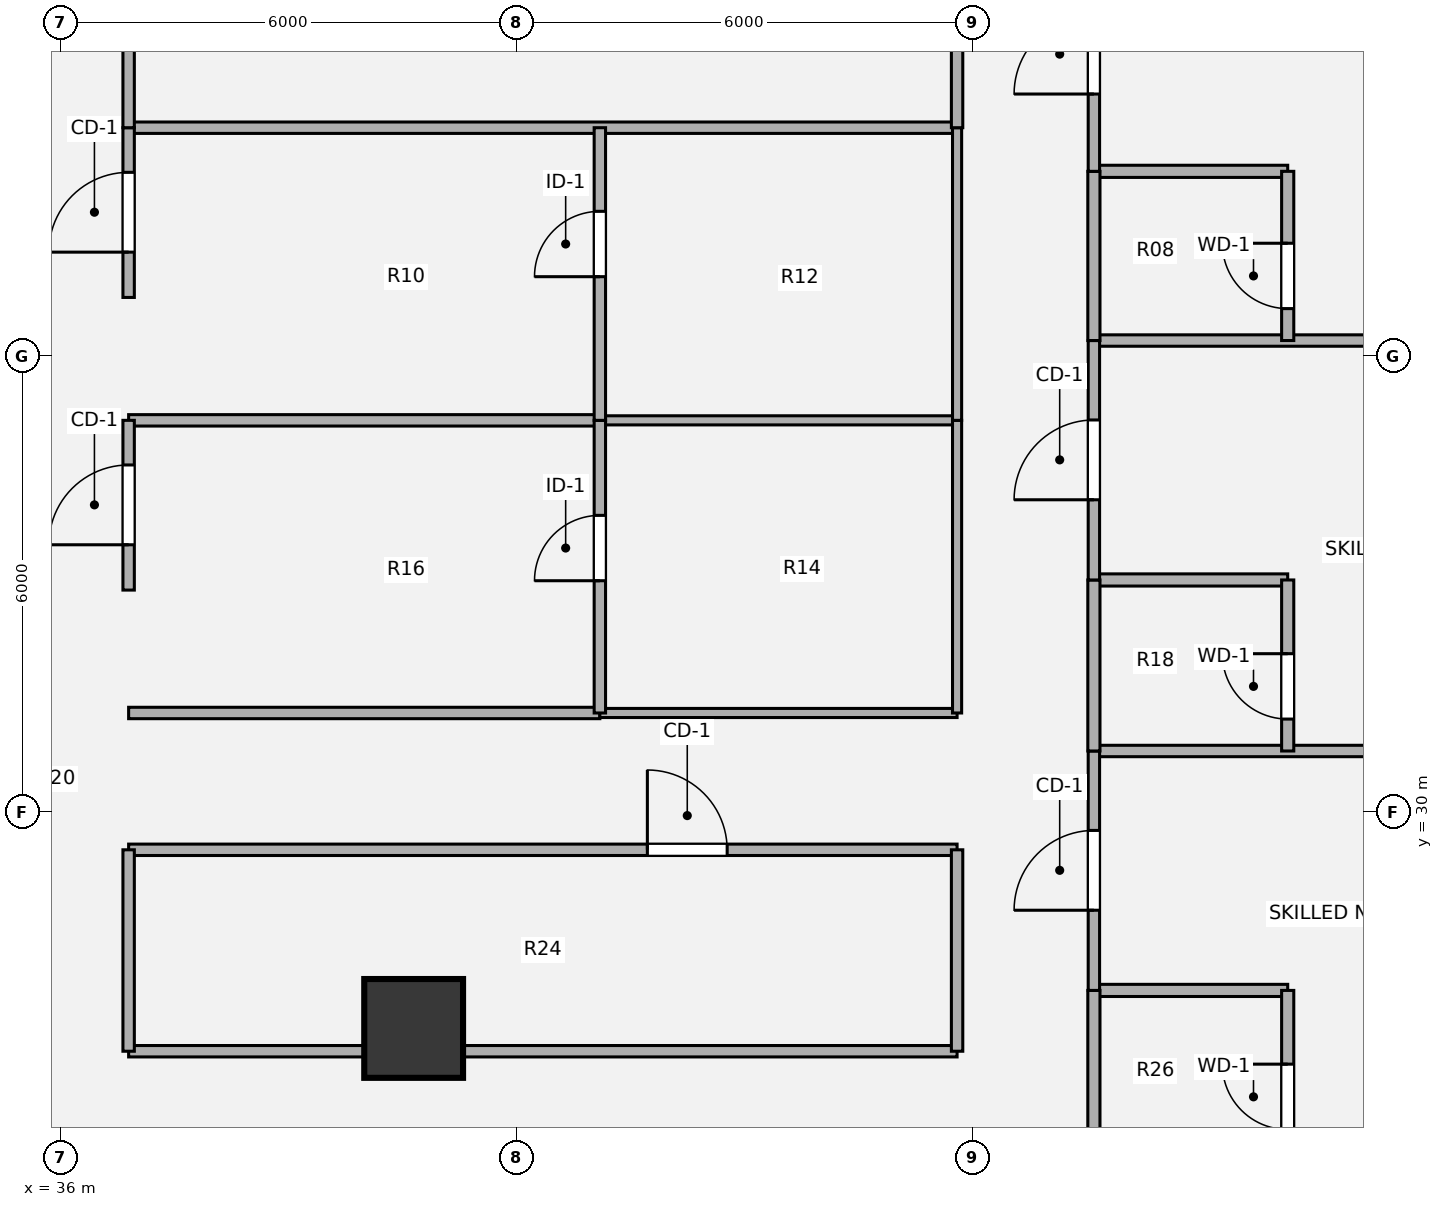
"""IFC4 building model, lengths in metres.
Left out: names, types, materials, properties, quantities, classifications, styles, units other than length and angle.
Written with IfcOpenShell. Run it as: python <this file> out.ifc"""

import sys

from ifc_helpers import new_model, si_unit, direction, frame, frame_2d, origin, origin_2d, place, context, subcontext, project, spatial, rectangle, hollow_circle, extrude, source, transform, mapped, element, fill, save


model = new_model("IFC4")
c1 = context("Model", 3, precision=1e-05, world=origin(), true_north=direction((0.0, 1.0)))
c2 = subcontext(c1, "Body", "Model", "MODEL_VIEW")
j1 = project(units=[si_unit("LENGTHUNIT", "METRE"), si_unit("PLANEANGLEUNIT", "RADIAN")], contexts=[c1])
p1 = place(None, origin())
s1 = spatial("IfcSite", under=j1, at=p1, CompositionType="ELEMENT")
p2 = place(p1, origin())
s2 = spatial("IfcBuilding", under=s1, at=p2, CompositionType="ELEMENT")
p3 = place(p2, frame((0.0, 0.0, 127.62)))
s3 = spatial("IfcBuildingStorey", under=s2, at=p3, CompositionType="ELEMENT", Elevation=127.62)
m1 = source(origin(), c2, "Body", "SweptSolid", [
    extrude(hollow_circle(Radius=0.65, WallThickness=0.045, at=origin_2d()), origin(), (0.0, 0.0, 1.0), 3.78),
])
p4 = place(p3, frame((40.65, 27.15, 0.0), z_axis=(0.0, 0.0, 1.0), x_axis=(1.0, 0.0, 0.0)))
e1 = element("IfcColumn", 1, at=p4, inside=s3, PredefinedType="COLUMN", context=c2, shape_type="MappedRepresentation", body=[
    mapped(m1, transform((0.0, 0.0, 0.0), x_axis=(1.0, 0.0, 0.0), y_axis=(0.0, 1.0, 0.0), z_axis=(0.0, 0.0, 1.0), scale=1.0)),
])
p5 = place(p3, frame((36.9, 26.85, 0.0), z_axis=(0.0, 0.0, 1.0), x_axis=(1.0, 0.0, 0.0)))
e2 = element("IfcWall", 2, at=p5, inside=s3, PredefinedType="PARTITIONING", context=c2, shape_type="SweptSolid", body=[
    extrude(rectangle(XDim=10.9, YDim=0.15, at=frame_2d((5.45, 0.0))), origin(), (0.0, 0.0, 1.0), 2.903),
])
p6 = place(p3, frame((49.6, 27.65, 0.0), z_axis=(0.0, 0.0, 1.0), x_axis=(1.0, 0.0, 0.0)))
e3 = element("IfcWall", 3, at=p6, inside=s3, PredefinedType="PLUMBINGWALL", context=c2, shape_type="SweptSolid", body=[
    extrude(rectangle(XDim=2.55, YDim=0.16, at=frame_2d((1.275, 0.0))), origin(), (0.0, 0.0, 1.0), 2.982),
])
p7 = place(p3, frame((36.9, 29.5, 0.0), z_axis=(0.0, 0.0, 1.0), x_axis=(1.0, 0.0, 0.0)))
e4 = element("IfcWall", 4, at=p7, inside=s3, PredefinedType="PARTITIONING", context=c2, shape_type="SweptSolid", body=[
    extrude(rectangle(XDim=10.9, YDim=0.15, at=frame_2d((5.45, 0.0))), origin(), (0.0, 0.0, 1.0), 2.982),
])
p8 = place(p7, frame((6.825, 0.0, 0.0)))
e5 = element("IfcOpeningElement", 5, at=p8, cuts=e4, PredefinedType="OPENING", context=c2, shape_type="SweptSolid", body=[
    extrude(rectangle(XDim=1.05, YDim=2.1, at=origin_2d()), frame((0.525, 0.085, 1.05), z_axis=(0.0, -1.0, 0.0), x_axis=(1.0, 0.0, 0.0)), (0.0, 0.0, 1.0), 0.17),
])
p9 = place(p3, frame((49.6, 30.8, 0.0), z_axis=(0.0, 0.0, 1.0), x_axis=(1.0, 0.0, 0.0)))
e6 = element("IfcWall", 6, at=p9, inside=s3, PredefinedType="PARTITIONING", context=c2, shape_type="SweptSolid", body=[
    extrude(rectangle(XDim=8.42, YDim=0.15, at=frame_2d((4.21, 0.0))), origin(), (0.0, 0.0, 1.0), 2.982),
])
p10 = place(p3, frame((36.9, 31.3, 0.0), z_axis=(0.0, 0.0, 1.0), x_axis=(1.0, 0.0, 0.0)))
e7 = element("IfcWall", 7, at=p10, inside=s3, PredefinedType="PARTITIONING", context=c2, shape_type="SweptSolid", body=[
    extrude(rectangle(XDim=6.2, YDim=0.15, at=frame_2d((3.1, 0.0))), origin(), (0.0, 0.0, 1.0), 2.982),
])
p11 = place(p3, frame((43.1, 31.3, 0.0), z_axis=(0.0, 0.0, 1.0), x_axis=(1.0, 0.0, 0.0)))
e8 = element("IfcWall", 8, at=p11, inside=s3, PredefinedType="PARTITIONING", context=c2, shape_type="SweptSolid", body=[
    extrude(rectangle(XDim=4.7, YDim=0.12, at=frame_2d((2.35, 0.0))), origin(), (0.0, 0.0, 1.0), 2.982),
])
p12 = place(p3, frame((49.6, 33.05, 0.0), z_axis=(0.0, 0.0, 1.0), x_axis=(1.0, 0.0, 0.0)))
e9 = element("IfcWall", 9, at=p12, inside=s3, PredefinedType="PLUMBINGWALL", context=c2, shape_type="SweptSolid", body=[
    extrude(rectangle(XDim=2.55, YDim=0.16, at=frame_2d((1.275, 0.0))), origin(), (0.0, 0.0, 1.0), 2.982),
])
p13 = place(p3, frame((36.9, 35.15, 0.0), z_axis=(0.0, 0.0, 1.0), x_axis=(1.0, 0.0, 0.0)))
e10 = element("IfcWall", 10, at=p13, inside=s3, PredefinedType="PARTITIONING", context=c2, shape_type="SweptSolid", body=[
    extrude(rectangle(XDim=6.2, YDim=0.15, at=frame_2d((3.1, 0.0))), origin(), (0.0, 0.0, 1.0), 2.982),
])
p14 = place(p3, frame((43.1, 35.15, 0.0), z_axis=(0.0, 0.0, 1.0), x_axis=(1.0, 0.0, 0.0)))
e11 = element("IfcWall", 11, at=p14, inside=s3, PredefinedType="PARTITIONING", context=c2, shape_type="SweptSolid", body=[
    extrude(rectangle(XDim=4.7, YDim=0.12, at=frame_2d((2.35, 0.0))), origin(), (0.0, 0.0, 1.0), 2.982),
])
p15 = place(p3, frame((49.6, 36.2, 0.0), z_axis=(0.0, 0.0, 1.0), x_axis=(1.0, 0.0, 0.0)))
e12 = element("IfcWall", 12, at=p15, inside=s3, PredefinedType="PARTITIONING", context=c2, shape_type="SweptSolid", body=[
    extrude(rectangle(XDim=8.42, YDim=0.15, at=frame_2d((4.21, 0.0))), origin(), (0.0, 0.0, 1.0), 2.982),
])
p16 = place(p3, frame((49.6, 38.426, 0.0), z_axis=(0.0, 0.0, 1.0), x_axis=(1.0, 0.0, 0.0)))
e13 = element("IfcWall", 13, at=p16, inside=s3, PredefinedType="PLUMBINGWALL", context=c2, shape_type="SweptSolid", body=[
    extrude(rectangle(XDim=2.55, YDim=0.16, at=frame_2d((1.275, 0.0))), origin(), (0.0, 0.0, 1.0), 3.055),
])
p17 = place(p3, frame((36.9, 39.0, 0.0), z_axis=(0.0, 0.0, 1.0), x_axis=(1.0, 0.0, 0.0)))
e14 = element("IfcWall", 14, at=p17, inside=s3, PredefinedType="PARTITIONING", context=c2, shape_type="SweptSolid", body=[
    extrude(rectangle(XDim=10.9, YDim=0.15, at=frame_2d((5.45, 0.0))), origin(), (0.0, 0.0, 1.0), 2.903),
])
p18 = place(p3, frame((36.9, 26.85, 0.0), z_axis=(0.0, 0.0, 1.0), x_axis=(0.0, 1.0, 0.0)))
e15 = element("IfcWall", 15, at=p18, inside=s3, PredefinedType="PARTITIONING", context=c2, shape_type="SweptSolid", body=[
    extrude(rectangle(XDim=2.65, YDim=0.15, at=frame_2d((1.325, 0.0))), origin(), (0.0, 0.0, 1.0), 3.5),
])
p19 = place(p3, frame((36.9, 32.917, 0.0), z_axis=(0.0, 0.0, 1.0), x_axis=(0.0, 1.0, 0.0)))
e16 = element("IfcWall", 16, at=p19, inside=s3, PredefinedType="PARTITIONING", context=c2, shape_type="SweptSolid", body=[
    extrude(rectangle(XDim=2.233, YDim=0.15, at=frame_2d((1.116, 0.0))), origin(), (0.0, 0.0, 1.0), 3.5),
])
p20 = place(p19, frame((0.596, 0.0, 0.0)))
e17 = element("IfcOpeningElement", 17, at=p20, cuts=e16, PredefinedType="OPENING", context=c2, shape_type="SweptSolid", body=[
    extrude(rectangle(XDim=1.05, YDim=2.1, at=origin_2d()), frame((0.525, 0.085, 1.05), z_axis=(0.0, -1.0, 0.0), x_axis=(1.0, 0.0, 0.0)), (0.0, 0.0, 1.0), 0.17),
])
p21 = place(p3, frame((36.9, 36.767, 0.0), z_axis=(0.0, 0.0, 1.0), x_axis=(0.0, 1.0, 0.0)))
e18 = element("IfcWall", 18, at=p21, inside=s3, PredefinedType="PARTITIONING", context=c2, shape_type="SweptSolid", body=[
    extrude(rectangle(XDim=2.233, YDim=0.15, at=frame_2d((1.116, 0.0))), origin(), (0.0, 0.0, 1.0), 3.5),
])
p22 = place(p21, frame((0.596, 0.0, 0.0)))
e19 = element("IfcOpeningElement", 19, at=p22, cuts=e18, PredefinedType="OPENING", context=c2, shape_type="SweptSolid", body=[
    extrude(rectangle(XDim=1.05, YDim=2.1, at=origin_2d()), frame((0.525, 0.085, 1.05), z_axis=(0.0, -1.0, 0.0), x_axis=(1.0, 0.0, 0.0)), (0.0, 0.0, 1.0), 0.17),
])
p23 = place(p3, frame((36.9, 39.0, 0.0), z_axis=(0.0, 0.0, 1.0), x_axis=(0.0, 1.0, 0.0)))
e20 = element("IfcWall", 20, at=p23, inside=s3, PredefinedType="PARTITIONING", context=c2, shape_type="SweptSolid", body=[
    extrude(rectangle(XDim=7.7, YDim=0.15, at=frame_2d((3.85, 0.0))), origin(), (0.0, 0.0, 1.0), 3.5),
])
p24 = place(p23, frame((3.475, 0.0, 0.0)))
e21 = element("IfcOpeningElement", 21, at=p24, cuts=e20, PredefinedType="OPENING", context=c2, shape_type="SweptSolid", body=[
    extrude(rectangle(XDim=1.05, YDim=2.1, at=origin_2d()), frame((0.525, 0.085, 1.05), z_axis=(0.0, -1.0, 0.0), x_axis=(1.0, 0.0, 0.0)), (0.0, 0.0, 1.0), 0.17),
])
p25 = place(p3, frame((43.1, 31.3, 0.0), z_axis=(0.0, 0.0, 1.0), x_axis=(0.0, 1.0, 0.0)))
e22 = element("IfcWall", 22, at=p25, inside=s3, PredefinedType="PARTITIONING", context=c2, shape_type="SweptSolid", body=[
    extrude(rectangle(XDim=3.85, YDim=0.15, at=frame_2d((1.925, 0.0))), origin(), (0.0, 0.0, 1.0), 3.5),
])
p26 = place(p25, frame((1.74, 0.0, 0.0)))
e23 = element("IfcOpeningElement", 23, at=p26, cuts=e22, PredefinedType="OPENING", context=c2, shape_type="SweptSolid", body=[
    extrude(rectangle(XDim=0.86, YDim=2.1, at=origin_2d()), frame((0.43, 0.085, 1.05), z_axis=(0.0, -1.0, 0.0), x_axis=(1.0, 0.0, 0.0)), (0.0, 0.0, 1.0), 0.17),
])
p27 = place(p3, frame((43.1, 35.15, 0.0), z_axis=(0.0, 0.0, 1.0), x_axis=(0.0, 1.0, 0.0)))
e24 = element("IfcWall", 24, at=p27, inside=s3, PredefinedType="PARTITIONING", context=c2, shape_type="SweptSolid", body=[
    extrude(rectangle(XDim=3.85, YDim=0.15, at=frame_2d((1.925, 0.0))), origin(), (0.0, 0.0, 1.0), 3.5),
])
p28 = place(p27, frame((1.89, 0.0, 0.0)))
e25 = element("IfcOpeningElement", 25, at=p28, cuts=e24, PredefinedType="OPENING", context=c2, shape_type="SweptSolid", body=[
    extrude(rectangle(XDim=0.86, YDim=2.1, at=origin_2d()), frame((0.43, 0.085, 1.05), z_axis=(0.0, -1.0, 0.0), x_axis=(1.0, 0.0, 0.0)), (0.0, 0.0, 1.0), 0.17),
])
p29 = place(p3, frame((47.8, 26.85, 0.0), z_axis=(0.0, 0.0, 1.0), x_axis=(0.0, 1.0, 0.0)))
e26 = element("IfcWall", 26, at=p29, inside=s3, PredefinedType="PARTITIONING", context=c2, shape_type="SweptSolid", body=[
    extrude(rectangle(XDim=2.65, YDim=0.15, at=frame_2d((1.325, 0.0))), origin(), (0.0, 0.0, 1.0), 3.5),
])
p30 = place(p3, frame((47.8, 31.3, 0.0), z_axis=(0.0, 0.0, 1.0), x_axis=(0.0, 1.0, 0.0)))
e27 = element("IfcWall", 27, at=p30, inside=s3, PredefinedType="PARTITIONING", context=c2, shape_type="SweptSolid", body=[
    extrude(rectangle(XDim=3.85, YDim=0.12, at=frame_2d((1.925, 0.0))), origin(), (0.0, 0.0, 1.0), 3.5),
])
p31 = place(p3, frame((47.8, 35.15, 0.0), z_axis=(0.0, 0.0, 1.0), x_axis=(0.0, 1.0, 0.0)))
e28 = element("IfcWall", 28, at=p31, inside=s3, PredefinedType="PARTITIONING", context=c2, shape_type="SweptSolid", body=[
    extrude(rectangle(XDim=3.85, YDim=0.12, at=frame_2d((1.925, 0.0))), origin(), (0.0, 0.0, 1.0), 3.5),
])
p32 = place(p3, frame((47.8, 39.0, 0.0), z_axis=(0.0, 0.0, 1.0), x_axis=(0.0, 1.0, 0.0)))
e29 = element("IfcWall", 29, at=p32, inside=s3, PredefinedType="PARTITIONING", context=c2, shape_type="SweptSolid", body=[
    extrude(rectangle(XDim=8.321, YDim=0.15, at=frame_2d((4.16, 0.0))), origin(), (0.0, 0.0, 1.0), 3.5),
])
p33 = place(p3, frame((49.6, 25.4, 0.0), z_axis=(0.0, 0.0, 1.0), x_axis=(0.0, 1.0, 0.0)))
e30 = element("IfcWall", 30, at=p33, inside=s3, PredefinedType="PLUMBINGWALL", context=c2, shape_type="SweptSolid", body=[
    extrude(rectangle(XDim=2.25, YDim=0.16, at=frame_2d((1.125, 0.0))), origin(), (0.0, 0.0, 1.0), 3.5),
])
p34 = place(p3, frame((49.6, 27.65, 0.0), z_axis=(0.0, 0.0, 1.0), x_axis=(0.0, 1.0, 0.0)))
e31 = element("IfcWall", 31, at=p34, inside=s3, PredefinedType="PARTITIONING", context=c2, shape_type="SweptSolid", body=[
    extrude(rectangle(XDim=3.15, YDim=0.15, at=frame_2d((1.575, 0.0))), origin(), (0.0, 0.0, 1.0), 3.5),
])
p35 = place(p34, frame((1.055, 0.0, 0.0)))
e32 = element("IfcOpeningElement", 32, at=p35, cuts=e31, PredefinedType="OPENING", context=c2, shape_type="SweptSolid", body=[
    extrude(rectangle(XDim=1.05, YDim=2.1, at=origin_2d()), frame((0.525, 0.085, 1.05), z_axis=(0.0, -1.0, 0.0), x_axis=(1.0, 0.0, 0.0)), (0.0, 0.0, 1.0), 0.17),
])
p36 = place(p3, frame((49.6, 30.8, 0.0), z_axis=(0.0, 0.0, 1.0), x_axis=(0.0, 1.0, 0.0)))
e33 = element("IfcWall", 33, at=p36, inside=s3, PredefinedType="PLUMBINGWALL", context=c2, shape_type="SweptSolid", body=[
    extrude(rectangle(XDim=2.25, YDim=0.16, at=frame_2d((1.125, 0.0))), origin(), (0.0, 0.0, 1.0), 3.5),
])
p37 = place(p3, frame((49.6, 33.05, 0.0), z_axis=(0.0, 0.0, 1.0), x_axis=(0.0, 1.0, 0.0)))
e34 = element("IfcWall", 34, at=p37, inside=s3, PredefinedType="PARTITIONING", context=c2, shape_type="SweptSolid", body=[
    extrude(rectangle(XDim=3.15, YDim=0.15, at=frame_2d((1.575, 0.0))), origin(), (0.0, 0.0, 1.0), 3.5),
])
p38 = place(p37, frame((1.055, 0.0, 0.0)))
e35 = element("IfcOpeningElement", 35, at=p38, cuts=e34, PredefinedType="OPENING", context=c2, shape_type="SweptSolid", body=[
    extrude(rectangle(XDim=1.05, YDim=2.1, at=origin_2d()), frame((0.525, 0.085, 1.05), z_axis=(0.0, -1.0, 0.0), x_axis=(1.0, 0.0, 0.0)), (0.0, 0.0, 1.0), 0.17),
])
p39 = place(p3, frame((49.6, 36.2, 0.0), z_axis=(0.0, 0.0, 1.0), x_axis=(0.0, 1.0, 0.0)))
e36 = element("IfcWall", 36, at=p39, inside=s3, PredefinedType="PLUMBINGWALL", context=c2, shape_type="SweptSolid", body=[
    extrude(rectangle(XDim=2.226, YDim=0.16, at=frame_2d((1.113, 0.0))), origin(), (0.0, 0.0, 1.0), 3.5),
])
p40 = place(p3, frame((49.6, 38.426, 0.0), z_axis=(0.0, 0.0, 1.0), x_axis=(0.0, 1.0, 0.0)))
e37 = element("IfcWall", 37, at=p40, inside=s3, PredefinedType="PARTITIONING", context=c2, shape_type="SweptSolid", body=[
    extrude(rectangle(XDim=3.074, YDim=0.15, at=frame_2d((1.537, 0.0))), origin(), (0.0, 0.0, 1.0), 3.5),
])
p41 = place(p40, frame((1.017, 0.0, 0.0)))
e38 = element("IfcOpeningElement", 38, at=p41, cuts=e37, PredefinedType="OPENING", context=c2, shape_type="SweptSolid", body=[
    extrude(rectangle(XDim=1.05, YDim=2.1, at=origin_2d()), frame((0.525, 0.085, 1.05), z_axis=(0.0, -1.0, 0.0), x_axis=(1.0, 0.0, 0.0)), (0.0, 0.0, 1.0), 0.17),
])
p42 = place(p3, frame((52.15, 25.4, 0.0), z_axis=(0.0, 0.0, 1.0), x_axis=(0.0, 1.0, 0.0)))
e39 = element("IfcWall", 39, at=p42, inside=s3, PredefinedType="PLUMBINGWALL", context=c2, shape_type="SweptSolid", body=[
    extrude(rectangle(XDim=2.25, YDim=0.16, at=frame_2d((1.125, 0.0))), origin(), (0.0, 0.0, 1.0), 3.5),
])
p43 = place(p42, frame((0.42, 0.0, 0.0)))
e40 = element("IfcOpeningElement", 40, at=p43, cuts=e39, PredefinedType="OPENING", context=c2, shape_type="SweptSolid", body=[
    extrude(rectangle(XDim=0.86, YDim=2.1, at=origin_2d()), frame((0.43, 0.09, 1.05), z_axis=(0.0, -1.0, 0.0), x_axis=(1.0, 0.0, 0.0)), (0.0, 0.0, 1.0), 0.18),
])
p44 = place(p3, frame((52.15, 30.8, 0.0), z_axis=(0.0, 0.0, 1.0), x_axis=(0.0, 1.0, 0.0)))
e41 = element("IfcWall", 41, at=p44, inside=s3, PredefinedType="PLUMBINGWALL", context=c2, shape_type="SweptSolid", body=[
    extrude(rectangle(XDim=2.25, YDim=0.16, at=frame_2d((1.125, 0.0))), origin(), (0.0, 0.0, 1.0), 3.5),
])
p45 = place(p44, frame((0.42, 0.0, 0.0)))
e42 = element("IfcOpeningElement", 42, at=p45, cuts=e41, PredefinedType="OPENING", context=c2, shape_type="SweptSolid", body=[
    extrude(rectangle(XDim=0.86, YDim=2.1, at=origin_2d()), frame((0.43, 0.09, 1.05), z_axis=(0.0, -1.0, 0.0), x_axis=(1.0, 0.0, 0.0)), (0.0, 0.0, 1.0), 0.18),
])
p46 = place(p3, frame((52.15, 36.2, 0.0), z_axis=(0.0, 0.0, 1.0), x_axis=(0.0, 1.0, 0.0)))
e43 = element("IfcWall", 43, at=p46, inside=s3, PredefinedType="PLUMBINGWALL", context=c2, shape_type="SweptSolid", body=[
    extrude(rectangle(XDim=2.226, YDim=0.16, at=frame_2d((1.113, 0.0))), origin(), (0.0, 0.0, 1.0), 3.5),
])
p47 = place(p46, frame((0.42, 0.0, 0.0)))
e44 = element("IfcOpeningElement", 44, at=p47, cuts=e43, PredefinedType="OPENING", context=c2, shape_type="SweptSolid", body=[
    extrude(rectangle(XDim=0.86, YDim=2.1, at=origin_2d()), frame((0.43, 0.09, 1.05), z_axis=(0.0, -1.0, 0.0), x_axis=(1.0, 0.0, 0.0)), (0.0, 0.0, 1.0), 0.18),
])
m2 = source(origin(), c2, "Body", "SweptSolid", [
    extrude(rectangle(XDim=1.05, YDim=2.1, at=origin_2d()), frame((0.525, 0.025, 1.05), z_axis=(0.0, -1.0, 0.0), x_axis=(1.0, 0.0, 0.0)), (0.0, 0.0, 1.0), 0.05),
])
p48 = place(p8, origin())
e45 = element("IfcDoor", 45, at=p48, inside=s3, OperationType="SINGLE_SWING_LEFT", PredefinedType="DOOR", context=c2, shape_type="MappedRepresentation", body=[
    mapped(m2, transform((0.0, 0.0, 0.0), x_axis=(1.0, 0.0, 0.0), y_axis=(0.0, 1.0, 0.0), z_axis=(0.0, 0.0, 1.0), scale=1.0)),
])
fill(e5, e45)
p49 = place(p20, origin())
e46 = element("IfcDoor", 46, at=p49, inside=s3, OperationType="SINGLE_SWING_LEFT", PredefinedType="DOOR", context=c2, shape_type="MappedRepresentation", body=[
    mapped(m2, transform((0.0, 0.0, 0.0), x_axis=(1.0, 0.0, 0.0), y_axis=(0.0, 1.0, 0.0), z_axis=(0.0, 0.0, 1.0), scale=1.0)),
])
fill(e17, e46)
p50 = place(p22, origin())
e47 = element("IfcDoor", 47, at=p50, inside=s3, OperationType="SINGLE_SWING_LEFT", PredefinedType="DOOR", context=c2, shape_type="MappedRepresentation", body=[
    mapped(m2, transform((0.0, 0.0, 0.0), x_axis=(1.0, 0.0, 0.0), y_axis=(0.0, 1.0, 0.0), z_axis=(0.0, 0.0, 1.0), scale=1.0)),
])
fill(e19, e47)
m3 = source(origin(), c2, "Body", "SweptSolid", [
    extrude(rectangle(XDim=0.86, YDim=2.1, at=origin_2d()), frame((0.43, 0.025, 1.05), z_axis=(0.0, -1.0, 0.0), x_axis=(1.0, 0.0, 0.0)), (0.0, 0.0, 1.0), 0.05),
])
p51 = place(p26, origin())
e48 = element("IfcDoor", 48, at=p51, inside=s3, OperationType="SINGLE_SWING_LEFT", PredefinedType="DOOR", context=c2, shape_type="MappedRepresentation", body=[
    mapped(m3, transform((0.0, 0.0, 0.0), x_axis=(1.0, 0.0, 0.0), y_axis=(0.0, 1.0, 0.0), z_axis=(0.0, 0.0, 1.0), scale=1.0)),
])
fill(e23, e48)
p52 = place(p28, origin())
e49 = element("IfcDoor", 49, at=p52, inside=s3, OperationType="SINGLE_SWING_LEFT", PredefinedType="DOOR", context=c2, shape_type="MappedRepresentation", body=[
    mapped(m3, transform((0.0, 0.0, 0.0), x_axis=(1.0, 0.0, 0.0), y_axis=(0.0, 1.0, 0.0), z_axis=(0.0, 0.0, 1.0), scale=1.0)),
])
fill(e25, e49)
p53 = place(p35, origin())
e50 = element("IfcDoor", 50, at=p53, inside=s3, OperationType="SINGLE_SWING_LEFT", PredefinedType="DOOR", context=c2, shape_type="MappedRepresentation", body=[
    mapped(m2, transform((0.0, 0.0, 0.0), x_axis=(1.0, 0.0, 0.0), y_axis=(0.0, 1.0, 0.0), z_axis=(0.0, 0.0, 1.0), scale=1.0)),
])
fill(e32, e50)
p54 = place(p38, origin())
e51 = element("IfcDoor", 51, at=p54, inside=s3, OperationType="SINGLE_SWING_LEFT", PredefinedType="DOOR", context=c2, shape_type="MappedRepresentation", body=[
    mapped(m2, transform((0.0, 0.0, 0.0), x_axis=(1.0, 0.0, 0.0), y_axis=(0.0, 1.0, 0.0), z_axis=(0.0, 0.0, 1.0), scale=1.0)),
])
fill(e35, e51)
p55 = place(p41, origin())
e52 = element("IfcDoor", 52, at=p55, inside=s3, OperationType="SINGLE_SWING_LEFT", PredefinedType="DOOR", context=c2, shape_type="MappedRepresentation", body=[
    mapped(m2, transform((0.0, 0.0, 0.0), x_axis=(1.0, 0.0, 0.0), y_axis=(0.0, 1.0, 0.0), z_axis=(0.0, 0.0, 1.0), scale=1.0)),
])
fill(e38, e52)
m4 = source(origin(), c2, "Body", "SweptSolid", [
    extrude(rectangle(XDim=0.86, YDim=2.1, at=origin_2d()), frame((0.43, 0.025, 1.05), z_axis=(0.0, -1.0, 0.0), x_axis=(1.0, 0.0, 0.0)), (0.0, 0.0, 1.0), 0.05),
])
p56 = place(p43, origin())
e53 = element("IfcDoor", 53, at=p56, inside=s3, OperationType="SINGLE_SWING_RIGHT", PredefinedType="DOOR", context=c2, shape_type="MappedRepresentation", body=[
    mapped(m4, transform((0.0, 0.0, 0.0), x_axis=(1.0, 0.0, 0.0), y_axis=(0.0, 1.0, 0.0), z_axis=(0.0, 0.0, 1.0), scale=1.0)),
])
fill(e40, e53)
p57 = place(p45, origin())
e54 = element("IfcDoor", 54, at=p57, inside=s3, OperationType="SINGLE_SWING_RIGHT", PredefinedType="DOOR", context=c2, shape_type="MappedRepresentation", body=[
    mapped(m4, transform((0.0, 0.0, 0.0), x_axis=(1.0, 0.0, 0.0), y_axis=(0.0, 1.0, 0.0), z_axis=(0.0, 0.0, 1.0), scale=1.0)),
])
fill(e42, e54)
p58 = place(p47, origin())
e55 = element("IfcDoor", 55, at=p58, inside=s3, OperationType="SINGLE_SWING_RIGHT", PredefinedType="DOOR", context=c2, shape_type="MappedRepresentation", body=[
    mapped(m4, transform((0.0, 0.0, 0.0), x_axis=(1.0, 0.0, 0.0), y_axis=(0.0, 1.0, 0.0), z_axis=(0.0, 0.0, 1.0), scale=1.0)),
])
fill(e44, e55)
save(model, sys.argv[1])
